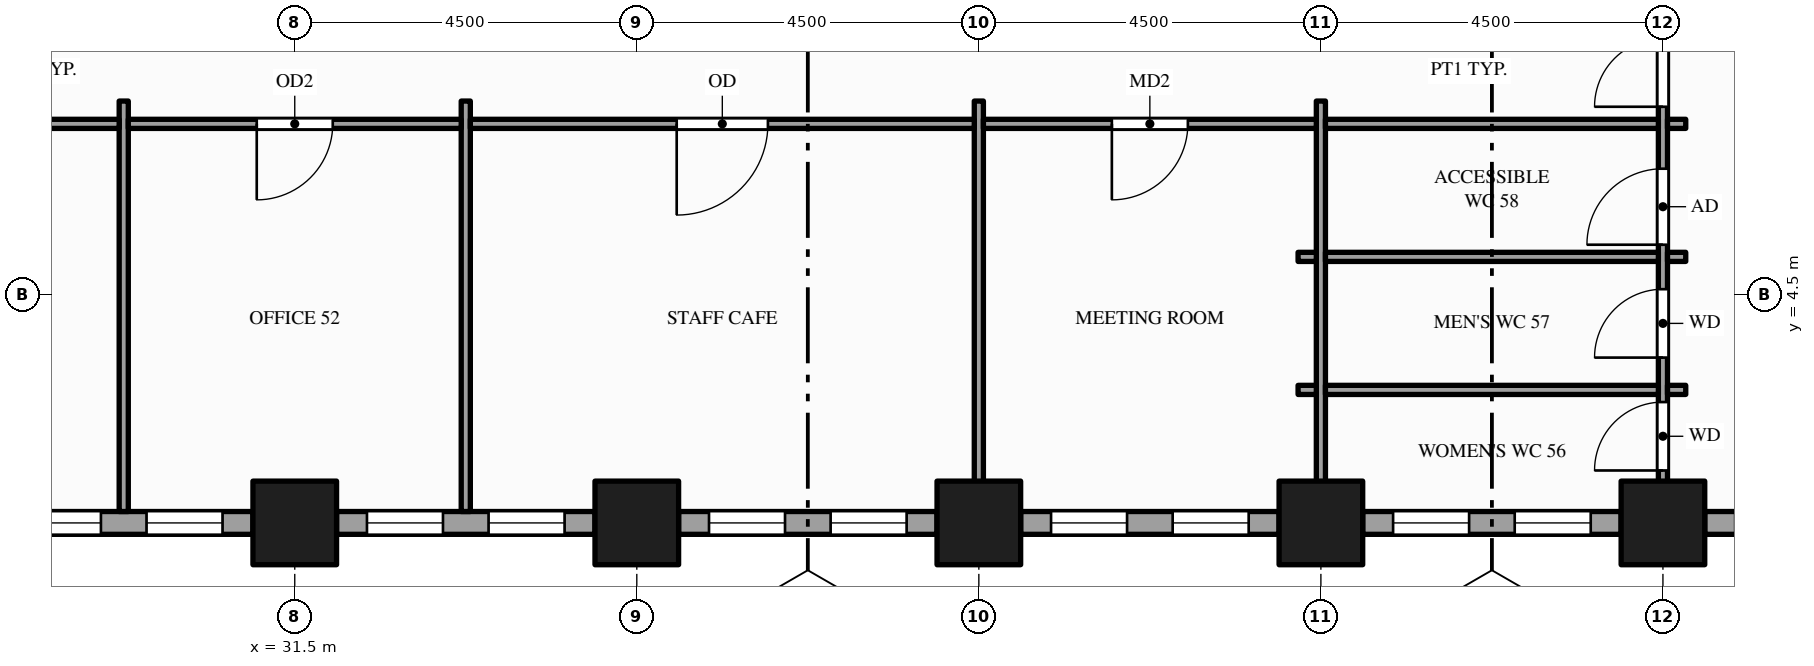
"""IFC4 building model, lengths in metres.
Left out: names, types, materials, properties, quantities, classifications, styles, units other than length and angle.
Written with IfcOpenShell. Run it as: python <this file> out.ifc"""

import sys

from ifc_helpers import new_model, si_unit, direction, frame, frame_2d, origin, origin_2d, place, context, subcontext, project, spatial, rectangle, hollow_rectangle, extrude, element, fill, save


model = new_model("IFC4")
c1 = context("Model", 3, precision=1e-05, world=origin(), true_north=direction((0.0, 1.0)))
c2 = subcontext(c1, "Body", "Model", "MODEL_VIEW")
j1 = project(units=[si_unit("LENGTHUNIT", "METRE"), si_unit("PLANEANGLEUNIT", "RADIAN")], contexts=[c1])
p1 = place(None, origin())
s1 = spatial("IfcSite", under=j1, at=p1, CompositionType="ELEMENT")
p2 = place(p1, origin())
s2 = spatial("IfcBuilding", under=s1, at=p2, CompositionType="ELEMENT")
p3 = place(p2, frame((0.0, 0.0, 57.0)))
s3 = spatial("IfcBuildingStorey", under=s2, at=p3, CompositionType="ELEMENT", Elevation=57.0)
for number, where, z_axis, x_axis in (
    (1, (31.5, 1.5, -0.15), (0.0, 0.0, 1.0), (1.0, 0.0, 0.0)),
    (2, (36.0, 1.5, -0.15), (0.0, 0.0, 1.0), (1.0, 0.0, 0.0)),
    (3, (40.5, 1.5, -0.15), (0.0, 0.0, 1.0), (1.0, 0.0, 0.0)),
    (4, (45.0, 1.5, -0.15), (0.0, 0.0, 1.0), (1.0, 0.0, 0.0)),
    (5, (49.5, 1.5, -0.15), (0.0, 0.0, 1.0), (1.0, 0.0, 0.0)),
):
    element("IfcColumn", number, at=place(p3, frame(where, z_axis=z_axis, x_axis=x_axis)), inside=s3, PredefinedType="COLUMN", context=c2, shape_type="SweptSolid", body=[
        extrude(hollow_rectangle(XDim=1.1, YDim=1.1, WallThickness=0.06, at=origin_2d()), origin(), (0.0, 0.0, 1.0), 4.0),
    ])
p4 = place(p3, frame((27.55, 1.5, 0.0), z_axis=(0.0, 0.0, 1.0), x_axis=(1.0, 0.0, 0.0)))
e6 = element("IfcWall", 6, at=p4, inside=s3, PredefinedType="STANDARD", context=c2, shape_type="SweptSolid", body=[
    extrude(rectangle(XDim=3.4, YDim=0.3, at=frame_2d((1.7, 0.0))), origin(), (0.0, 0.0, 1.0), 3.144),
])
p5 = place(p4, frame((0.4, 0.0, 0.9)))
e7 = element("IfcOpeningElement", 7, at=p5, cuts=e6, PredefinedType="OPENING", context=c2, shape_type="SweptSolid", body=[
    extrude(rectangle(XDim=1.0, YDim=2.0, at=frame_2d((0.5, 1.0))), frame((0.0, 0.16, 0.0), z_axis=(0.0, -1.0, 0.0), x_axis=(1.0, 0.0, 0.0)), (0.0, 0.0, 1.0), 0.32),
])
p6 = place(p4, frame((2.0, 0.0, 0.9)))
e8 = element("IfcOpeningElement", 8, at=p6, cuts=e6, PredefinedType="OPENING", context=c2, shape_type="SweptSolid", body=[
    extrude(rectangle(XDim=1.0, YDim=2.0, at=frame_2d((0.5, 1.0))), frame((0.0, 0.16, 0.0), z_axis=(0.0, -1.0, 0.0), x_axis=(1.0, 0.0, 0.0)), (0.0, 0.0, 1.0), 0.32),
])
p7 = place(p3, frame((32.05, 1.5, 0.0), z_axis=(0.0, 0.0, 1.0), x_axis=(1.0, 0.0, 0.0)))
e9 = element("IfcWall", 9, at=p7, inside=s3, PredefinedType="STANDARD", context=c2, shape_type="SweptSolid", body=[
    extrude(rectangle(XDim=3.4, YDim=0.3, at=frame_2d((1.7, 0.0))), origin(), (0.0, 0.0, 1.0), 3.144),
])
p8 = place(p7, frame((0.4, 0.0, 0.9)))
e10 = element("IfcOpeningElement", 10, at=p8, cuts=e9, PredefinedType="OPENING", context=c2, shape_type="SweptSolid", body=[
    extrude(rectangle(XDim=1.0, YDim=2.0, at=frame_2d((0.5, 1.0))), frame((0.0, 0.16, 0.0), z_axis=(0.0, -1.0, 0.0), x_axis=(1.0, 0.0, 0.0)), (0.0, 0.0, 1.0), 0.32),
])
p9 = place(p7, frame((2.0, 0.0, 0.9)))
e11 = element("IfcOpeningElement", 11, at=p9, cuts=e9, PredefinedType="OPENING", context=c2, shape_type="SweptSolid", body=[
    extrude(rectangle(XDim=1.0, YDim=2.0, at=frame_2d((0.5, 1.0))), frame((0.0, 0.16, 0.0), z_axis=(0.0, -1.0, 0.0), x_axis=(1.0, 0.0, 0.0)), (0.0, 0.0, 1.0), 0.32),
])
p10 = place(p3, frame((36.55, 1.5, 0.0), z_axis=(0.0, 0.0, 1.0), x_axis=(1.0, 0.0, 0.0)))
e12 = element("IfcWall", 12, at=p10, inside=s3, PredefinedType="STANDARD", context=c2, shape_type="SweptSolid", body=[
    extrude(rectangle(XDim=3.4, YDim=0.3, at=frame_2d((1.7, 0.0))), origin(), (0.0, 0.0, 1.0), 3.144),
])
p11 = place(p10, frame((0.4, 0.0, 0.9)))
e13 = element("IfcOpeningElement", 13, at=p11, cuts=e12, PredefinedType="OPENING", context=c2, shape_type="SweptSolid", body=[
    extrude(rectangle(XDim=1.0, YDim=2.0, at=frame_2d((0.5, 1.0))), frame((0.0, 0.16, 0.0), z_axis=(0.0, -1.0, 0.0), x_axis=(1.0, 0.0, 0.0)), (0.0, 0.0, 1.0), 0.32),
])
p12 = place(p10, frame((2.0, 0.0, 0.9)))
e14 = element("IfcOpeningElement", 14, at=p12, cuts=e12, PredefinedType="OPENING", context=c2, shape_type="SweptSolid", body=[
    extrude(rectangle(XDim=1.0, YDim=2.0, at=frame_2d((0.5, 1.0))), frame((0.0, 0.16, 0.0), z_axis=(0.0, -1.0, 0.0), x_axis=(1.0, 0.0, 0.0)), (0.0, 0.0, 1.0), 0.32),
])
p13 = place(p3, frame((41.05, 1.5, 0.0), z_axis=(0.0, 0.0, 1.0), x_axis=(1.0, 0.0, 0.0)))
e15 = element("IfcWall", 15, at=p13, inside=s3, PredefinedType="STANDARD", context=c2, shape_type="SweptSolid", body=[
    extrude(rectangle(XDim=3.4, YDim=0.3, at=frame_2d((1.7, 0.0))), origin(), (0.0, 0.0, 1.0), 3.144),
])
p14 = place(p13, frame((0.4, 0.0, 0.9)))
e16 = element("IfcOpeningElement", 16, at=p14, cuts=e15, PredefinedType="OPENING", context=c2, shape_type="SweptSolid", body=[
    extrude(rectangle(XDim=1.0, YDim=2.0, at=frame_2d((0.5, 1.0))), frame((0.0, 0.16, 0.0), z_axis=(0.0, -1.0, 0.0), x_axis=(1.0, 0.0, 0.0)), (0.0, 0.0, 1.0), 0.32),
])
p15 = place(p13, frame((2.0, 0.0, 0.9)))
e17 = element("IfcOpeningElement", 17, at=p15, cuts=e15, PredefinedType="OPENING", context=c2, shape_type="SweptSolid", body=[
    extrude(rectangle(XDim=1.0, YDim=2.0, at=frame_2d((0.5, 1.0))), frame((0.0, 0.16, 0.0), z_axis=(0.0, -1.0, 0.0), x_axis=(1.0, 0.0, 0.0)), (0.0, 0.0, 1.0), 0.32),
])
p16 = place(p3, frame((45.55, 1.5, 0.0), z_axis=(0.0, 0.0, 1.0), x_axis=(1.0, 0.0, 0.0)))
e18 = element("IfcWall", 18, at=p16, inside=s3, PredefinedType="STANDARD", context=c2, shape_type="SweptSolid", body=[
    extrude(rectangle(XDim=3.4, YDim=0.3, at=frame_2d((1.7, 0.0))), origin(), (0.0, 0.0, 1.0), 3.144),
])
p17 = place(p16, frame((0.4, 0.0, 0.9)))
e19 = element("IfcOpeningElement", 19, at=p17, cuts=e18, PredefinedType="OPENING", context=c2, shape_type="SweptSolid", body=[
    extrude(rectangle(XDim=1.0, YDim=2.0, at=frame_2d((0.5, 1.0))), frame((0.0, 0.16, 0.0), z_axis=(0.0, -1.0, 0.0), x_axis=(1.0, 0.0, 0.0)), (0.0, 0.0, 1.0), 0.32),
])
p18 = place(p16, frame((2.0, 0.0, 0.9)))
e20 = element("IfcOpeningElement", 20, at=p18, cuts=e18, PredefinedType="OPENING", context=c2, shape_type="SweptSolid", body=[
    extrude(rectangle(XDim=1.0, YDim=2.0, at=frame_2d((0.5, 1.0))), frame((0.0, 0.16, 0.0), z_axis=(0.0, -1.0, 0.0), x_axis=(1.0, 0.0, 0.0)), (0.0, 0.0, 1.0), 0.32),
])
p19 = place(p3, frame((50.05, 1.5, 0.0), z_axis=(0.0, 0.0, 1.0), x_axis=(1.0, 0.0, 0.0)))
e21 = element("IfcWall", 21, at=p19, inside=s3, PredefinedType="STANDARD", context=c2, shape_type="SweptSolid", body=[
    extrude(rectangle(XDim=3.95, YDim=0.3, at=frame_2d((1.975, 0.0))), origin(), (0.0, 0.0, 1.0), 3.144),
])
p20 = place(p19, frame((0.4, 0.0, 0.9)))
e22 = element("IfcOpeningElement", 22, at=p20, cuts=e21, PredefinedType="OPENING", context=c2, shape_type="SweptSolid", body=[
    extrude(rectangle(XDim=1.0, YDim=2.0, at=frame_2d((0.5, 1.0))), frame((0.0, 0.16, 0.0), z_axis=(0.0, -1.0, 0.0), x_axis=(1.0, 0.0, 0.0)), (0.0, 0.0, 1.0), 0.32),
])
p21 = place(p19, frame((2.0, 0.0, 0.9)))
e23 = element("IfcOpeningElement", 23, at=p21, cuts=e21, PredefinedType="OPENING", context=c2, shape_type="SweptSolid", body=[
    extrude(rectangle(XDim=1.55, YDim=2.0, at=frame_2d((0.775, 1.0))), frame((0.0, 0.16, 0.0), z_axis=(0.0, -1.0, 0.0), x_axis=(1.0, 0.0, 0.0)), (0.0, 0.0, 1.0), 0.32),
])
for number, where, z_axis, x_axis in (
    (24, (29.25, 1.65, 0.0), (0.0, 0.0, 1.0), (0.0, 1.0, 0.0)),
    (25, (33.75, 1.65, 0.0), (0.0, 0.0, 1.0), (0.0, 1.0, 0.0)),
    (26, (40.5, 1.65, 0.0), (0.0, 0.0, 1.0), (0.0, 1.0, 0.0)),
    (27, (45.0, 1.65, 0.0), (0.0, 0.0, 1.0), (0.0, 1.0, 0.0)),
):
    element("IfcWall", number, at=place(p3, frame(where, z_axis=z_axis, x_axis=x_axis)), inside=s3, PredefinedType="PARTITIONING", context=c2, shape_type="SweptSolid", body=[
        extrude(rectangle(XDim=5.4, YDim=0.12, at=frame_2d((2.7, 0.0))), origin(), (0.0, 0.0, 1.0), 2.938),
    ])
p22 = place(p3, frame((49.5, 1.65, 0.0), z_axis=(0.0, 0.0, 1.0), x_axis=(0.0, 1.0, 0.0)))
e28 = element("IfcWall", 28, at=p22, inside=s3, PredefinedType="PARTITIONING", context=c2, shape_type="SweptSolid", body=[
    extrude(rectangle(XDim=22.2, YDim=0.12, at=frame_2d((11.1, 0.0))), origin(), (0.0, 0.0, 1.0), 2.938),
])
p23 = place(p22, frame((5.325, 0.0, 0.0)))
e29 = element("IfcOpeningElement", 29, at=p23, cuts=e28, PredefinedType="OPENING", context=c2, shape_type="SweptSolid", body=[
    extrude(rectangle(XDim=1.8, YDim=2.1, at=frame_2d((0.9, 1.05))), frame((0.0, 0.07, 0.0), z_axis=(0.0, -1.0, 0.0), x_axis=(1.0, 0.0, 0.0)), (0.0, 0.0, 1.0), 0.14),
])
p24 = place(p22, frame((0.54, 0.0, 0.0)))
e30 = element("IfcOpeningElement", 30, at=p24, cuts=e28, PredefinedType="OPENING", context=c2, shape_type="SweptSolid", body=[
    extrude(rectangle(XDim=0.9, YDim=2.1, at=frame_2d((0.45, 1.05))), frame((0.0, 0.07, 0.0), z_axis=(0.0, -1.0, 0.0), x_axis=(1.0, 0.0, 0.0)), (0.0, 0.0, 1.0), 0.14),
])
p25 = place(p22, frame((2.025, 0.0, 0.0)))
e31 = element("IfcOpeningElement", 31, at=p25, cuts=e28, PredefinedType="OPENING", context=c2, shape_type="SweptSolid", body=[
    extrude(rectangle(XDim=0.9, YDim=2.1, at=frame_2d((0.45, 1.05))), frame((0.0, 0.07, 0.0), z_axis=(0.0, -1.0, 0.0), x_axis=(1.0, 0.0, 0.0)), (0.0, 0.0, 1.0), 0.14),
])
p26 = place(p22, frame((3.51, 0.0, 0.0)))
e32 = element("IfcOpeningElement", 32, at=p26, cuts=e28, PredefinedType="OPENING", context=c2, shape_type="SweptSolid", body=[
    extrude(rectangle(XDim=1.0, YDim=2.1, at=frame_2d((0.5, 1.05))), frame((0.0, 0.07, 0.0), z_axis=(0.0, -1.0, 0.0), x_axis=(1.0, 0.0, 0.0)), (0.0, 0.0, 1.0), 0.14),
])
p27 = place(p3, frame((44.7, 3.25, 0.0), z_axis=(0.0, 0.0, 1.0), x_axis=(1.0, 0.0, 0.0)))
e33 = element("IfcWall", 33, at=p27, inside=s3, PredefinedType="PARTITIONING", context=c2, shape_type="SweptSolid", body=[
    extrude(rectangle(XDim=0.24, YDim=0.12, at=frame_2d((0.12, 0.0))), origin(), (0.0, 0.0, 1.0), 2.938),
])
p28 = place(p3, frame((45.06, 3.25, 0.0), z_axis=(0.0, 0.0, 1.0), x_axis=(1.0, 0.0, 0.0)))
e34 = element("IfcWall", 34, at=p28, inside=s3, PredefinedType="PARTITIONING", context=c2, shape_type="SweptSolid", body=[
    extrude(rectangle(XDim=4.38, YDim=0.12, at=frame_2d((2.19, 0.0))), origin(), (0.0, 0.0, 1.0), 2.938),
])
for number, where, z_axis, x_axis in (
    (35, (49.56, 3.25, 0.0), (0.0, 0.0, 1.0), (1.0, 0.0, 0.0)),
    (36, (44.7, 5.0, 0.0), (0.0, 0.0, 1.0), (1.0, 0.0, 0.0)),
):
    element("IfcWall", number, at=place(p3, frame(where, z_axis=z_axis, x_axis=x_axis)), inside=s3, PredefinedType="PARTITIONING", context=c2, shape_type="SweptSolid", body=[
        extrude(rectangle(XDim=0.24, YDim=0.12, at=frame_2d((0.12, 0.0))), origin(), (0.0, 0.0, 1.0), 2.938),
    ])
p29 = place(p3, frame((45.06, 5.0, 0.0), z_axis=(0.0, 0.0, 1.0), x_axis=(1.0, 0.0, 0.0)))
e37 = element("IfcWall", 37, at=p29, inside=s3, PredefinedType="PARTITIONING", context=c2, shape_type="SweptSolid", body=[
    extrude(rectangle(XDim=4.38, YDim=0.12, at=frame_2d((2.19, 0.0))), origin(), (0.0, 0.0, 1.0), 2.938),
])
p30 = place(p3, frame((49.56, 5.0, 0.0), z_axis=(0.0, 0.0, 1.0), x_axis=(1.0, 0.0, 0.0)))
e38 = element("IfcWall", 38, at=p30, inside=s3, PredefinedType="PARTITIONING", context=c2, shape_type="SweptSolid", body=[
    extrude(rectangle(XDim=0.24, YDim=0.12, at=frame_2d((0.12, 0.0))), origin(), (0.0, 0.0, 1.0), 2.938),
])
p31 = place(p3, frame((22.56, 6.75, 0.0), z_axis=(0.0, 0.0, 1.0), x_axis=(1.0, 0.0, 0.0)))
e39 = element("IfcWall", 39, at=p31, inside=s3, PredefinedType="PARTITIONING", context=c2, shape_type="SweptSolid", body=[
    extrude(rectangle(XDim=6.63, YDim=0.12, at=frame_2d((3.315, 0.0))), origin(), (0.0, 0.0, 1.0), 2.938),
])
p32 = place(p31, frame((2.865, 0.0, 0.0)))
e40 = element("IfcOpeningElement", 40, at=p32, cuts=e39, PredefinedType="OPENING", context=c2, shape_type="SweptSolid", body=[
    extrude(rectangle(XDim=0.9, YDim=2.1, at=frame_2d((0.45, 1.05))), frame((0.0, 0.07, 0.0), z_axis=(0.0, -1.0, 0.0), x_axis=(1.0, 0.0, 0.0)), (0.0, 0.0, 1.0), 0.14),
])
p33 = place(p3, frame((29.31, 6.75, 0.0), z_axis=(0.0, 0.0, 1.0), x_axis=(1.0, 0.0, 0.0)))
e41 = element("IfcWall", 41, at=p33, inside=s3, PredefinedType="PARTITIONING", context=c2, shape_type="SweptSolid", body=[
    extrude(rectangle(XDim=4.38, YDim=0.12, at=frame_2d((2.19, 0.0))), origin(), (0.0, 0.0, 1.0), 2.938),
])
p34 = place(p33, frame((1.69, 0.0, 0.0)))
e42 = element("IfcOpeningElement", 42, at=p34, cuts=e41, PredefinedType="OPENING", context=c2, shape_type="SweptSolid", body=[
    extrude(rectangle(XDim=1.0, YDim=2.1, at=frame_2d((0.5, 1.05))), frame((0.0, 0.07, 0.0), z_axis=(0.0, -1.0, 0.0), x_axis=(1.0, 0.0, 0.0)), (0.0, 0.0, 1.0), 0.14),
])
p35 = place(p3, frame((33.81, 6.75, 0.0), z_axis=(0.0, 0.0, 1.0), x_axis=(1.0, 0.0, 0.0)))
e43 = element("IfcWall", 43, at=p35, inside=s3, PredefinedType="PARTITIONING", context=c2, shape_type="SweptSolid", body=[
    extrude(rectangle(XDim=6.63, YDim=0.12, at=frame_2d((3.315, 0.0))), origin(), (0.0, 0.0, 1.0), 2.938),
])
p36 = place(p35, frame((2.715, 0.0, 0.0)))
e44 = element("IfcOpeningElement", 44, at=p36, cuts=e43, PredefinedType="OPENING", context=c2, shape_type="SweptSolid", body=[
    extrude(rectangle(XDim=1.2, YDim=2.1, at=frame_2d((0.6, 1.05))), frame((0.0, 0.07, 0.0), z_axis=(0.0, -1.0, 0.0), x_axis=(1.0, 0.0, 0.0)), (0.0, 0.0, 1.0), 0.14),
])
p37 = place(p3, frame((40.56, 6.75, 0.0), z_axis=(0.0, 0.0, 1.0), x_axis=(1.0, 0.0, 0.0)))
e45 = element("IfcWall", 45, at=p37, inside=s3, PredefinedType="PARTITIONING", context=c2, shape_type="SweptSolid", body=[
    extrude(rectangle(XDim=4.38, YDim=0.12, at=frame_2d((2.19, 0.0))), origin(), (0.0, 0.0, 1.0), 2.938),
])
p38 = place(p37, frame((1.69, 0.0, 0.0)))
e46 = element("IfcOpeningElement", 46, at=p38, cuts=e45, PredefinedType="OPENING", context=c2, shape_type="SweptSolid", body=[
    extrude(rectangle(XDim=1.0, YDim=2.1, at=frame_2d((0.5, 1.05))), frame((0.0, 0.07, 0.0), z_axis=(0.0, -1.0, 0.0), x_axis=(1.0, 0.0, 0.0)), (0.0, 0.0, 1.0), 0.14),
])
p39 = place(p3, frame((45.06, 6.75, 0.0), z_axis=(0.0, 0.0, 1.0), x_axis=(1.0, 0.0, 0.0)))
e47 = element("IfcWall", 47, at=p39, inside=s3, PredefinedType="PARTITIONING", context=c2, shape_type="SweptSolid", body=[
    extrude(rectangle(XDim=4.38, YDim=0.12, at=frame_2d((2.19, 0.0))), origin(), (0.0, 0.0, 1.0), 2.938),
])
p40 = place(p3, frame((49.56, 6.75, 0.0), z_axis=(0.0, 0.0, 1.0), x_axis=(1.0, 0.0, 0.0)))
e48 = element("IfcWall", 48, at=p40, inside=s3, PredefinedType="PARTITIONING", context=c2, shape_type="SweptSolid", body=[
    extrude(rectangle(XDim=0.24, YDim=0.12, at=frame_2d((0.12, 0.0))), origin(), (0.0, 0.0, 1.0), 2.938),
])
p41 = place(p5, origin())
e49 = element("IfcWindow", 49, at=p41, inside=s3, PartitioningType="SINGLE_PANEL", PredefinedType="WINDOW", context=c2, shape_type="SweptSolid", body=[
    extrude(rectangle(XDim=1.0, YDim=2.0, at=frame_2d((0.5, 1.0))), frame((0.0, 0.03, 0.0), z_axis=(0.0, -1.0, 0.0), x_axis=(1.0, 0.0, 0.0)), (0.0, 0.0, 1.0), 0.06),
])
fill(e7, e49)
p42 = place(p6, origin())
e50 = element("IfcWindow", 50, at=p42, inside=s3, PartitioningType="SINGLE_PANEL", PredefinedType="WINDOW", context=c2, shape_type="SweptSolid", body=[
    extrude(rectangle(XDim=1.0, YDim=2.0, at=frame_2d((0.5, 1.0))), frame((0.0, 0.03, 0.0), z_axis=(0.0, -1.0, 0.0), x_axis=(1.0, 0.0, 0.0)), (0.0, 0.0, 1.0), 0.06),
])
fill(e8, e50)
p43 = place(p8, origin())
e51 = element("IfcWindow", 51, at=p43, inside=s3, PartitioningType="SINGLE_PANEL", PredefinedType="WINDOW", context=c2, shape_type="SweptSolid", body=[
    extrude(rectangle(XDim=1.0, YDim=2.0, at=frame_2d((0.5, 1.0))), frame((0.0, 0.03, 0.0), z_axis=(0.0, -1.0, 0.0), x_axis=(1.0, 0.0, 0.0)), (0.0, 0.0, 1.0), 0.06),
])
fill(e10, e51)
p44 = place(p9, origin())
e52 = element("IfcWindow", 52, at=p44, inside=s3, PartitioningType="SINGLE_PANEL", PredefinedType="WINDOW", context=c2, shape_type="SweptSolid", body=[
    extrude(rectangle(XDim=1.0, YDim=2.0, at=frame_2d((0.5, 1.0))), frame((0.0, 0.03, 0.0), z_axis=(0.0, -1.0, 0.0), x_axis=(1.0, 0.0, 0.0)), (0.0, 0.0, 1.0), 0.06),
])
fill(e11, e52)
p45 = place(p11, origin())
e53 = element("IfcWindow", 53, at=p45, inside=s3, PartitioningType="SINGLE_PANEL", PredefinedType="WINDOW", context=c2, shape_type="SweptSolid", body=[
    extrude(rectangle(XDim=1.0, YDim=2.0, at=frame_2d((0.5, 1.0))), frame((0.0, 0.03, 0.0), z_axis=(0.0, -1.0, 0.0), x_axis=(1.0, 0.0, 0.0)), (0.0, 0.0, 1.0), 0.06),
])
fill(e13, e53)
p46 = place(p12, origin())
e54 = element("IfcWindow", 54, at=p46, inside=s3, PartitioningType="SINGLE_PANEL", PredefinedType="WINDOW", context=c2, shape_type="SweptSolid", body=[
    extrude(rectangle(XDim=1.0, YDim=2.0, at=frame_2d((0.5, 1.0))), frame((0.0, 0.03, 0.0), z_axis=(0.0, -1.0, 0.0), x_axis=(1.0, 0.0, 0.0)), (0.0, 0.0, 1.0), 0.06),
])
fill(e14, e54)
p47 = place(p14, origin())
e55 = element("IfcWindow", 55, at=p47, inside=s3, PartitioningType="SINGLE_PANEL", PredefinedType="WINDOW", context=c2, shape_type="SweptSolid", body=[
    extrude(rectangle(XDim=1.0, YDim=2.0, at=frame_2d((0.5, 1.0))), frame((0.0, 0.03, 0.0), z_axis=(0.0, -1.0, 0.0), x_axis=(1.0, 0.0, 0.0)), (0.0, 0.0, 1.0), 0.06),
])
fill(e16, e55)
p48 = place(p15, origin())
e56 = element("IfcWindow", 56, at=p48, inside=s3, PartitioningType="SINGLE_PANEL", PredefinedType="WINDOW", context=c2, shape_type="SweptSolid", body=[
    extrude(rectangle(XDim=1.0, YDim=2.0, at=frame_2d((0.5, 1.0))), frame((0.0, 0.03, 0.0), z_axis=(0.0, -1.0, 0.0), x_axis=(1.0, 0.0, 0.0)), (0.0, 0.0, 1.0), 0.06),
])
fill(e17, e56)
p49 = place(p17, origin())
e57 = element("IfcWindow", 57, at=p49, inside=s3, PartitioningType="SINGLE_PANEL", PredefinedType="WINDOW", context=c2, shape_type="SweptSolid", body=[
    extrude(rectangle(XDim=1.0, YDim=2.0, at=frame_2d((0.5, 1.0))), frame((0.0, 0.03, 0.0), z_axis=(0.0, -1.0, 0.0), x_axis=(1.0, 0.0, 0.0)), (0.0, 0.0, 1.0), 0.06),
])
fill(e19, e57)
p50 = place(p18, origin())
e58 = element("IfcWindow", 58, at=p50, inside=s3, PartitioningType="SINGLE_PANEL", PredefinedType="WINDOW", context=c2, shape_type="SweptSolid", body=[
    extrude(rectangle(XDim=1.0, YDim=2.0, at=frame_2d((0.5, 1.0))), frame((0.0, 0.03, 0.0), z_axis=(0.0, -1.0, 0.0), x_axis=(1.0, 0.0, 0.0)), (0.0, 0.0, 1.0), 0.06),
])
fill(e20, e58)
p51 = place(p23, origin())
e59 = element("IfcDoor", 59, at=p51, inside=s3, OperationType="DOUBLE_DOOR_SINGLE_SWING", PredefinedType="DOOR", context=c2, shape_type="SweptSolid", body=[
    extrude(rectangle(XDim=1.8, YDim=2.1, at=frame_2d((0.9, 1.05))), frame((0.0, 0.025, 0.0), z_axis=(0.0, -1.0, 0.0), x_axis=(1.0, 0.0, 0.0)), (0.0, 0.0, 1.0), 0.05),
])
fill(e29, e59)
p52 = place(p34, origin())
e60 = element("IfcDoor", 60, at=p52, inside=s3, OperationType="SINGLE_SWING_LEFT", PredefinedType="DOOR", context=c2, shape_type="SweptSolid", body=[
    extrude(rectangle(XDim=1.0, YDim=2.1, at=frame_2d((0.5, 1.05))), frame((0.0, 0.025, 0.0), z_axis=(0.0, -1.0, 0.0), x_axis=(1.0, 0.0, 0.0)), (0.0, 0.0, 1.0), 0.05),
])
fill(e42, e60)
p53 = place(p36, origin())
e61 = element("IfcDoor", 61, at=p53, inside=s3, OperationType="SINGLE_SWING_LEFT", PredefinedType="DOOR", context=c2, shape_type="SweptSolid", body=[
    extrude(rectangle(XDim=1.2, YDim=2.1, at=frame_2d((0.6, 1.05))), frame((0.0, 0.025, 0.0), z_axis=(0.0, -1.0, 0.0), x_axis=(1.0, 0.0, 0.0)), (0.0, 0.0, 1.0), 0.05),
])
fill(e44, e61)
p54 = place(p38, origin())
e62 = element("IfcDoor", 62, at=p54, inside=s3, OperationType="SINGLE_SWING_LEFT", PredefinedType="DOOR", context=c2, shape_type="SweptSolid", body=[
    extrude(rectangle(XDim=1.0, YDim=2.1, at=frame_2d((0.5, 1.05))), frame((0.0, 0.025, 0.0), z_axis=(0.0, -1.0, 0.0), x_axis=(1.0, 0.0, 0.0)), (0.0, 0.0, 1.0), 0.05),
])
fill(e46, e62)
p55 = place(p24, origin())
e63 = element("IfcDoor", 63, at=p55, inside=s3, OperationType="SINGLE_SWING_LEFT", PredefinedType="DOOR", context=c2, shape_type="SweptSolid", body=[
    extrude(rectangle(XDim=0.9, YDim=2.1, at=frame_2d((0.45, 1.05))), frame((0.0, 0.025, 0.0), z_axis=(0.0, -1.0, 0.0), x_axis=(1.0, 0.0, 0.0)), (0.0, 0.0, 1.0), 0.05),
])
fill(e30, e63)
p56 = place(p25, origin())
e64 = element("IfcDoor", 64, at=p56, inside=s3, OperationType="SINGLE_SWING_LEFT", PredefinedType="DOOR", context=c2, shape_type="SweptSolid", body=[
    extrude(rectangle(XDim=0.9, YDim=2.1, at=frame_2d((0.45, 1.05))), frame((0.0, 0.025, 0.0), z_axis=(0.0, -1.0, 0.0), x_axis=(1.0, 0.0, 0.0)), (0.0, 0.0, 1.0), 0.05),
])
fill(e31, e64)
p57 = place(p26, origin())
e65 = element("IfcDoor", 65, at=p57, inside=s3, OperationType="SINGLE_SWING_LEFT", PredefinedType="DOOR", context=c2, shape_type="SweptSolid", body=[
    extrude(rectangle(XDim=1.0, YDim=2.1, at=frame_2d((0.5, 1.05))), frame((0.0, 0.025, 0.0), z_axis=(0.0, -1.0, 0.0), x_axis=(1.0, 0.0, 0.0)), (0.0, 0.0, 1.0), 0.05),
])
fill(e32, e65)
save(model, sys.argv[1])
